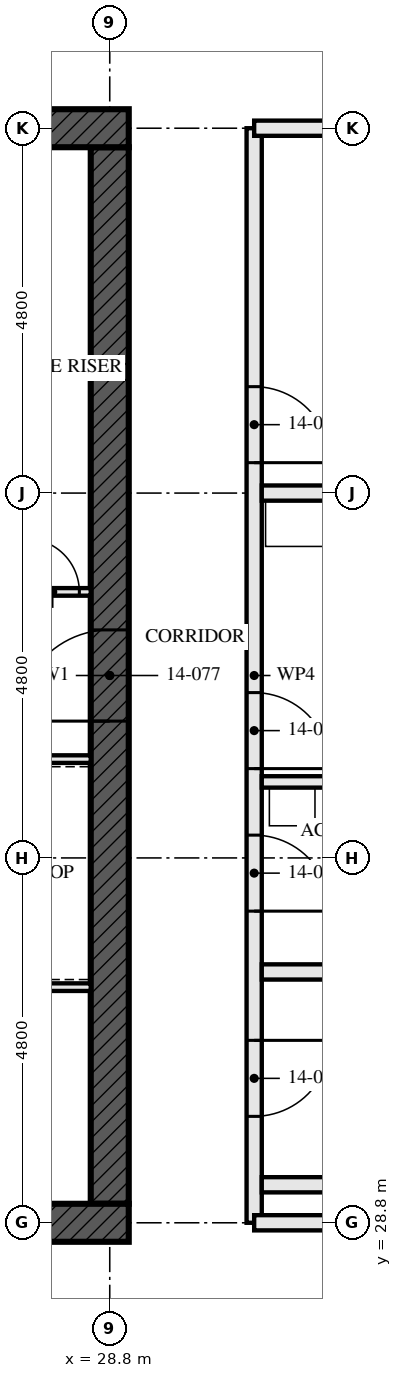
"""IFC4 building model, lengths in metres.
Left out: names, types, materials, properties, quantities, classifications, styles, units other than length and angle.
Written with IfcOpenShell. Run it as: python <this file> out.ifc"""

import sys

from ifc_helpers import new_model, si_unit, direction, frame, frame_2d, origin, place, context, subcontext, project, spatial, rectangle, extrude, element, fill, save


model = new_model("IFC4")
c1 = context("Model", 3, precision=1e-05, world=origin(), true_north=direction((0.0, 1.0)))
c2 = subcontext(c1, "Body", "Model", "MODEL_VIEW")
j1 = project(units=[si_unit("LENGTHUNIT", "METRE"), si_unit("PLANEANGLEUNIT", "RADIAN")], contexts=[c1])
p1 = place(None, origin())
s1 = spatial("IfcSite", under=j1, at=p1, CompositionType="ELEMENT")
p2 = place(p1, origin())
s2 = spatial("IfcBuilding", under=s1, at=p2, CompositionType="ELEMENT")
p3 = place(p2, frame((0.0, 0.0, 55.0)))
s3 = spatial("IfcBuildingStorey", under=s2, at=p3, CompositionType="ELEMENT", Elevation=55.0)
p4 = place(p3, frame((14.15, 28.8, -0.17), z_axis=(0.0, 0.0, 1.0), x_axis=(1.0, 0.0, 0.0)))
e1 = element("IfcWall", 1, at=p4, inside=s3, PredefinedType="SHEAR", context=c2, shape_type="SweptSolid", body=[
    extrude(rectangle(XDim=14.9, YDim=0.5, at=frame_2d((7.45, 0.0))), origin(), (0.0, 0.0, 1.0), 3.5),
])
p5 = place(p4, frame((6.85, 0.0, 0.17)))
e2 = element("IfcOpeningElement", 2, at=p5, cuts=e1, PredefinedType="OPENING", context=c2, shape_type="SweptSolid", body=[
    extrude(rectangle(XDim=1.2, YDim=2.1, at=frame_2d((0.6, 1.05))), frame((0.0, 0.26, 0.0), z_axis=(0.0, -1.0, 0.0), x_axis=(1.0, 0.0, 0.0)), (0.0, 0.0, 1.0), 0.521),
])
p6 = place(p3, frame((29.05, 43.2, -0.17), z_axis=(0.0, 0.0, 1.0), x_axis=(-1.0, 0.0, 0.0)))
e3 = element("IfcWall", 3, at=p6, inside=s3, PredefinedType="SHEAR", context=c2, shape_type="SweptSolid", body=[
    extrude(rectangle(XDim=14.9, YDim=0.5, at=frame_2d((7.45, 0.0))), origin(), (0.0, 0.0, 1.0), 3.5),
])
p7 = place(p6, frame((6.85, 0.0, 0.17)))
e4 = element("IfcOpeningElement", 4, at=p7, cuts=e3, PredefinedType="OPENING", context=c2, shape_type="SweptSolid", body=[
    extrude(rectangle(XDim=1.2, YDim=2.1, at=frame_2d((0.6, 1.05))), frame((0.0, 0.26, 0.0), z_axis=(0.0, -1.0, 0.0), x_axis=(1.0, 0.0, 0.0)), (0.0, 0.0, 1.0), 0.521),
])
p8 = place(p3, frame((28.8, 29.05, -0.17), z_axis=(0.0, 0.0, 1.0), x_axis=(0.0, 1.0, 0.0)))
e5 = element("IfcWall", 5, at=p8, inside=s3, PredefinedType="SHEAR", context=c2, shape_type="SweptSolid", body=[
    extrude(rectangle(XDim=13.9, YDim=0.5, at=frame_2d((6.95, 0.0))), origin(), (0.0, 0.0, 1.0), 3.5),
])
p9 = place(p8, frame((6.35, 0.0, 0.17)))
e6 = element("IfcOpeningElement", 6, at=p9, cuts=e5, PredefinedType="OPENING", context=c2, shape_type="SweptSolid", body=[
    extrude(rectangle(XDim=1.2, YDim=2.1, at=frame_2d((0.6, 1.05))), frame((0.0, 0.26, 0.0), z_axis=(0.0, -1.0, 0.0), x_axis=(1.0, 0.0, 0.0)), (0.0, 0.0, 1.0), 0.521),
])
for number, where, z_axis, x_axis in (
    (7, (35.5, 29.3, 0.0), (0.0, 0.0, 1.0), (-1.0, 0.0, 0.0)),
    (8, (35.5, 32.1, 0.0), (0.0, 0.0, 1.0), (-1.0, 0.0, 0.0)),
):
    element("IfcWall", number, at=place(p3, frame(where, z_axis=z_axis, x_axis=x_axis)), inside=s3, PredefinedType="SOLIDWALL", context=c2, shape_type="SweptSolid", body=[
        extrude(rectangle(XDim=4.7, YDim=0.2, at=frame_2d((2.35, 0.0))), origin(), (0.0, 0.0, 1.0), 2.99),
    ])
p10 = place(p3, frame((33.8, 34.6, 0.0), z_axis=(0.0, 0.0, 1.0), x_axis=(-1.0, 0.0, 0.0)))
e9 = element("IfcWall", 9, at=p10, inside=s3, PredefinedType="PARTITIONING", context=c2, shape_type="SweptSolid", body=[
    extrude(rectangle(XDim=3.0, YDim=0.15, at=frame_2d((1.5, 0.0))), origin(), (0.0, 0.0, 1.0), 3.33),
])
p11 = place(p3, frame((42.805, 38.4, 0.0), z_axis=(0.0, 0.0, 1.0), x_axis=(-1.0, 0.0, 0.0)))
e10 = element("IfcWall", 10, at=p11, inside=s3, PredefinedType="PARTITIONING", context=c2, shape_type="SweptSolid", body=[
    extrude(rectangle(XDim=12.005, YDim=0.2, at=frame_2d((6.002, 0.0))), origin(), (0.0, 0.0, 1.0), 2.55),
])
p12 = place(p3, frame((30.7, 28.8, 0.0), z_axis=(0.0, 0.0, 1.0), x_axis=(0.0, 1.0, 0.0)))
e11 = element("IfcWall", 11, at=p12, inside=s3, PredefinedType="PARTITIONING", context=c2, shape_type="SweptSolid", body=[
    extrude(rectangle(XDim=14.4, YDim=0.2, at=frame_2d((7.2, 0.0))), origin(), (0.0, 0.0, 1.0), 2.55),
])
p13 = place(p12, frame((1.4, 0.0, 0.0)))
e12 = element("IfcOpeningElement", 12, at=p13, cuts=e11, PredefinedType="OPENING", context=c2, shape_type="SweptSolid", body=[
    extrude(rectangle(XDim=1.0, YDim=2.1, at=frame_2d((0.5, 1.05))), frame((0.0, 0.111, 0.0), z_axis=(0.0, -1.0, 0.0), x_axis=(1.0, 0.0, 0.0)), (0.0, 0.0, 1.0), 0.221),
])
p14 = place(p12, frame((4.1, 0.0, 0.0)))
e13 = element("IfcOpeningElement", 13, at=p14, cuts=e11, PredefinedType="OPENING", context=c2, shape_type="SweptSolid", body=[
    extrude(rectangle(XDim=1.0, YDim=2.1, at=frame_2d((0.5, 1.05))), frame((0.0, 0.111, 0.0), z_axis=(0.0, -1.0, 0.0), x_axis=(1.0, 0.0, 0.0)), (0.0, 0.0, 1.0), 0.221),
])
p15 = place(p12, frame((5.975, 0.0, 0.0)))
e14 = element("IfcOpeningElement", 14, at=p15, cuts=e11, PredefinedType="OPENING", context=c2, shape_type="SweptSolid", body=[
    extrude(rectangle(XDim=1.0, YDim=2.1, at=frame_2d((0.5, 1.05))), frame((0.0, 0.111, 0.0), z_axis=(0.0, -1.0, 0.0), x_axis=(1.0, 0.0, 0.0)), (0.0, 0.0, 1.0), 0.221),
])
p16 = place(p12, frame((10.0, 0.0, 0.0)))
e15 = element("IfcOpeningElement", 15, at=p16, cuts=e11, PredefinedType="OPENING", context=c2, shape_type="SweptSolid", body=[
    extrude(rectangle(XDim=1.0, YDim=2.1, at=frame_2d((0.5, 1.05))), frame((0.0, 0.111, 0.0), z_axis=(0.0, -1.0, 0.0), x_axis=(1.0, 0.0, 0.0)), (0.0, 0.0, 1.0), 0.221),
])
p17 = place(p3, frame((23.05, 34.9, 0.0), z_axis=(0.0, 0.0, 1.0), x_axis=(1.0, 0.0, 0.0)))
e16 = element("IfcWall", 16, at=p17, inside=s3, PredefinedType="SOLIDWALL", context=c2, shape_type="SweptSolid", body=[
    extrude(rectangle(XDim=5.5, YDim=0.1, at=frame_2d((2.75, 0.0))), origin(), (0.0, 0.0, 1.0), 3.33),
])
p18 = place(p3, frame((22.65, 37.1, 0.0), z_axis=(0.0, 0.0, 1.0), x_axis=(1.0, 0.0, 0.0)))
e17 = element("IfcWall", 17, at=p18, inside=s3, PredefinedType="SOLIDWALL", context=c2, shape_type="SweptSolid", body=[
    extrude(rectangle(XDim=5.9, YDim=0.1, at=frame_2d((2.95, 0.0))), origin(), (0.0, 0.0, 1.0), 3.33),
])
p19 = place(p18, frame((3.45, 0.0, 0.0)))
e18 = element("IfcOpeningElement", 18, at=p19, cuts=e17, PredefinedType="OPENING", context=c2, shape_type="SweptSolid", body=[
    extrude(rectangle(XDim=1.0, YDim=2.1, at=frame_2d((0.5, 1.05))), frame((0.0, 0.061, 0.0), z_axis=(0.0, -1.0, 0.0), x_axis=(1.0, 0.0, 0.0)), (0.0, 0.0, 1.0), 0.121),
])
p20 = place(p18, frame((5.05, 0.0, 0.0)))
e19 = element("IfcOpeningElement", 19, at=p20, cuts=e17, PredefinedType="OPENING", context=c2, shape_type="SweptSolid", body=[
    extrude(rectangle(XDim=0.7, YDim=2.1, at=frame_2d((0.35, 1.05))), frame((0.0, 0.061, 0.0), z_axis=(0.0, -1.0, 0.0), x_axis=(1.0, 0.0, 0.0)), (0.0, 0.0, 1.0), 0.121),
])
p21 = place(p3, frame((23.15, 31.9, 0.0), z_axis=(0.0, 0.0, 1.0), x_axis=(1.0, 0.0, 0.0)))
e20 = element("IfcWall", 20, at=p21, inside=s3, PredefinedType="SOLIDWALL", context=c2, shape_type="SweptSolid", body=[
    extrude(rectangle(XDim=5.4, YDim=0.1, at=frame_2d((2.7, 0.0))), origin(), (0.0, 0.0, 1.0), 3.33),
])
for number, where, z_axis, x_axis in (
    (21, (33.205, 28.8, 0.0), (0.0, 0.0, 1.0), (-1.0, 0.0, 0.0)),
    (22, (33.205, 43.2, 0.0), (0.0, 0.0, 1.0), (-1.0, 0.0, 0.0)),
):
    element("IfcWall", number, at=place(p3, frame(where, z_axis=z_axis, x_axis=x_axis)), inside=s3, PredefinedType="PARTITIONING", context=c2, shape_type="SweptSolid", body=[
        extrude(rectangle(XDim=2.505, YDim=0.2, at=frame_2d((1.252, 0.0))), origin(), (0.0, 0.0, 1.0), 2.32),
    ])
p22 = place(p13, frame((1.0, 0.0, 0.0), z_axis=(0.0, 0.0, 1.0), x_axis=(-1.0, 0.0, 0.0)))
e23 = element("IfcDoor", 23, at=p22, inside=s3, OperationType="SINGLE_SWING_RIGHT", PredefinedType="DOOR", context=c2, shape_type="SweptSolid", body=[
    extrude(rectangle(XDim=1.0, YDim=2.1, at=frame_2d((0.5, 1.05))), frame((0.0, 0.032, 0.0), z_axis=(0.0, -1.0, 0.0), x_axis=(1.0, 0.0, 0.0)), (0.0, 0.0, 1.0), 0.064),
])
fill(e12, e23)
p23 = place(p14, frame((1.0, 0.0, 0.0), z_axis=(0.0, 0.0, 1.0), x_axis=(-1.0, 0.0, 0.0)))
e24 = element("IfcDoor", 24, at=p23, inside=s3, OperationType="SINGLE_SWING_LEFT", PredefinedType="DOOR", context=c2, shape_type="SweptSolid", body=[
    extrude(rectangle(XDim=1.0, YDim=2.1, at=frame_2d((0.5, 1.05))), frame((0.0, 0.027, 0.0), z_axis=(0.0, -1.0, 0.0), x_axis=(1.0, 0.0, 0.0)), (0.0, 0.0, 1.0), 0.054),
])
fill(e13, e24)
p24 = place(p15, frame((1.0, 0.0, 0.0), z_axis=(0.0, 0.0, 1.0), x_axis=(-1.0, 0.0, 0.0)))
e25 = element("IfcDoor", 25, at=p24, inside=s3, OperationType="SINGLE_SWING_LEFT", PredefinedType="DOOR", context=c2, shape_type="SweptSolid", body=[
    extrude(rectangle(XDim=1.0, YDim=2.1, at=frame_2d((0.5, 1.05))), frame((0.0, 0.027, 0.0), z_axis=(0.0, -1.0, 0.0), x_axis=(1.0, 0.0, 0.0)), (0.0, 0.0, 1.0), 0.054),
])
fill(e14, e25)
p25 = place(p16, frame((1.0, 0.0, 0.0), z_axis=(0.0, 0.0, 1.0), x_axis=(-1.0, 0.0, 0.0)))
e26 = element("IfcDoor", 26, at=p25, inside=s3, OperationType="SINGLE_SWING_LEFT", PredefinedType="DOOR", context=c2, shape_type="SweptSolid", body=[
    extrude(rectangle(XDim=1.0, YDim=2.1, at=frame_2d((0.5, 1.05))), frame((0.0, 0.027, 0.0), z_axis=(0.0, -1.0, 0.0), x_axis=(1.0, 0.0, 0.0)), (0.0, 0.0, 1.0), 0.054),
])
fill(e15, e26)
p26 = place(p20, origin())
e27 = element("IfcDoor", 27, at=p26, inside=s3, OperationType="SINGLE_SWING_RIGHT", PredefinedType="DOOR", context=c2, shape_type="SweptSolid", body=[
    extrude(rectangle(XDim=0.7, YDim=2.1, at=frame_2d((0.35, 1.05))), frame((0.0, 0.027, 0.0), z_axis=(0.0, -1.0, 0.0), x_axis=(1.0, 0.0, 0.0)), (0.0, 0.0, 1.0), 0.054),
])
fill(e19, e27)
p27 = place(p9, origin())
e28 = element("IfcDoor", 28, at=p27, inside=s3, OperationType="SINGLE_SWING_LEFT", PredefinedType="DOOR", context=c2, shape_type="SweptSolid", body=[
    extrude(rectangle(XDim=1.2, YDim=2.1, at=frame_2d((0.6, 1.05))), frame((0.0, 0.027, 0.0), z_axis=(0.0, -1.0, 0.0), x_axis=(1.0, 0.0, 0.0)), (0.0, 0.0, 1.0), 0.054),
])
fill(e6, e28)
save(model, sys.argv[1])
